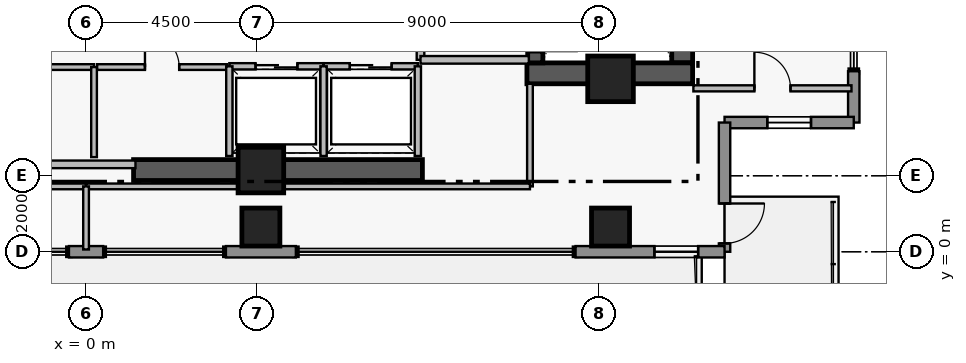
"""IFC4 building model, lengths in metres.
Left out: names, types, materials, properties, quantities, classifications, styles, units other than length and angle.
Written with IfcOpenShell. Run it as: python <this file> out.ifc"""

import sys

from ifc_helpers import new_model, si_unit, direction, frame, frame_2d, origin, origin_2d, place, context, subcontext, project, spatial, rectangle, extrude, element, fill, save


model = new_model("IFC4")
c1 = context("Model", 3, precision=1e-05, world=origin(), true_north=direction((0.0, 1.0)))
c2 = subcontext(c1, "Body", "Model", "MODEL_VIEW")
j1 = project(units=[si_unit("LENGTHUNIT", "METRE"), si_unit("PLANEANGLEUNIT", "RADIAN")], contexts=[c1])
p1 = place(None, origin())
s1 = spatial("IfcSite", under=j1, at=p1, CompositionType="ELEMENT")
p2 = place(p1, origin())
s2 = spatial("IfcBuilding", under=s1, at=p2, CompositionType="ELEMENT")
p3 = place(p2, frame((0.0, 0.0, 254.45)))
s3 = spatial("IfcBuildingStorey", under=s2, at=p3, CompositionType="ELEMENT", Elevation=254.45)
p4 = place(p3, frame((15.685, 4.97, 0.0), z_axis=(0.0, 0.0, 1.0), x_axis=(0.0, 1.0, 0.0)))
e1 = element("IfcWall", 1, at=p4, inside=s3, PredefinedType="SHEAR", context=c2, shape_type="SweptSolid", body=[
    extrude(rectangle(XDim=8.96, YDim=0.55, at=frame_2d((4.48, 0.0))), origin(), (0.0, 0.0, 1.0), 3.51),
])
p5 = place(p3, frame((11.6, 4.695, 0.0), z_axis=(0.0, 0.0, 1.0), x_axis=(1.0, 0.0, 0.0)))
e2 = element("IfcWall", 2, at=p5, inside=s3, PredefinedType="SHEAR", context=c2, shape_type="SweptSolid", body=[
    extrude(rectangle(XDim=4.36, YDim=0.55, at=frame_2d((2.18, 0.0))), origin(), (0.0, 0.0, 1.0), 3.51),
])
p6 = place(p3, frame((1.25, 2.15, 0.0), z_axis=(0.0, 0.0, 1.0), x_axis=(1.0, 0.0, 0.0)))
e3 = element("IfcWall", 3, at=p6, inside=s3, PredefinedType="SHEAR", context=c2, shape_type="SweptSolid", body=[
    extrude(rectangle(XDim=7.6, YDim=0.55, at=frame_2d((3.8, 0.0))), origin(), (0.0, 0.0, 1.0), 3.48),
])
p7 = place(p3, frame((11.82, 13.93, 0.0), z_axis=(0.0, 0.0, 1.0), x_axis=(0.0, -1.0, 0.0)))
e4 = element("IfcWall", 4, at=p7, inside=s3, PredefinedType="SHEAR", context=c2, shape_type="SweptSolid", body=[
    extrude(rectangle(XDim=8.96, YDim=0.4, at=frame_2d((4.48, 0.0))), origin(), (0.0, 0.0, 1.0), 3.51),
])
p8 = place(p7, frame((7.53, 0.0, 0.0)))
e5 = element("IfcOpeningElement", 5, at=p8, cuts=e4, PredefinedType="OPENING", context=c2, shape_type="SweptSolid", body=[
    extrude(rectangle(XDim=1.12, YDim=2.22, at=frame_2d((0.56, 1.11))), frame((0.0, 0.21, 0.0), z_axis=(0.0, -1.0, 0.0), x_axis=(1.0, 0.0, 0.0)), (0.0, 0.0, 1.0), 0.42),
])
for number, where, z_axis, x_axis in (
    (6, (4.6, 2.15, 0.0), (0.0, 0.0, 1.0), (1.0, 0.0, 0.0)),
    (7, (13.8, 4.55, 0.0), (0.0, 0.0, 1.0), (1.0, 0.0, 0.0)),
):
    element("IfcColumn", number, at=place(p3, frame(where, z_axis=z_axis, x_axis=x_axis)), inside=s3, PredefinedType="COLUMN", context=c2, shape_type="SweptSolid", body=[
        extrude(rectangle(XDim=1.2, YDim=1.2, at=origin_2d()), origin(), (0.0, 0.0, 1.0), 3.7),
    ])
for number, where, z_axis, x_axis in (
    (8, (4.6, 0.65, 0.0), (0.0, 0.0, 1.0), (1.0, 0.0, 0.0)),
    (9, (13.8, 0.65, 0.0), (0.0, 0.0, 1.0), (1.0, 0.0, 0.0)),
):
    element("IfcColumn", number, at=place(p3, frame(where, z_axis=z_axis, x_axis=x_axis)), inside=s3, PredefinedType="COLUMN", context=c2, shape_type="SweptSolid", body=[
        extrude(rectangle(XDim=1.0, YDim=1.0, at=origin_2d()), origin(), (0.0, 0.0, 1.0), 3.7),
    ])
p9 = place(p3, frame((20.2, 4.75, 0.0), z_axis=(0.0, 0.0, 1.0), x_axis=(0.0, -1.0, 0.0)))
e10 = element("IfcWall", 10, at=p9, inside=s3, PredefinedType="STANDARD", context=c2, shape_type="SweptSolid", body=[
    extrude(rectangle(XDim=1.35, YDim=0.3, at=frame_2d((0.675, 0.0))), origin(), (0.0, 0.0, 1.0), 3.48),
])
p10 = place(p3, frame((20.2, 3.4, 0.0), z_axis=(0.0, 0.0, 1.0), x_axis=(-1.0, 0.0, 0.0)))
e11 = element("IfcWall", 11, at=p10, inside=s3, PredefinedType="STANDARD", context=c2, shape_type="SweptSolid", body=[
    extrude(rectangle(XDim=3.4, YDim=0.3, at=frame_2d((1.7, 0.0))), origin(), (0.0, 0.0, 1.0), 3.48),
])
p11 = place(p10, frame((1.125, 0.0, 1.25)))
e12 = element("IfcOpeningElement", 12, at=p11, cuts=e11, PredefinedType="OPENING", context=c2, shape_type="SweptSolid", body=[
    extrude(rectangle(XDim=1.15, YDim=1.55, at=frame_2d((0.575, 0.775))), frame((0.0, 0.16, 0.0), z_axis=(0.0, -1.0, 0.0), x_axis=(1.0, 0.0, 0.0)), (0.0, 0.0, 1.0), 0.32),
])
p12 = place(p3, frame((16.8, 3.4, 0.0), z_axis=(0.0, 0.0, 1.0), x_axis=(0.0, -1.0, 0.0)))
e13 = element("IfcWall", 13, at=p12, inside=s3, PredefinedType="STANDARD", context=c2, shape_type="SweptSolid", body=[
    extrude(rectangle(XDim=3.4, YDim=0.3, at=frame_2d((1.7, 0.0))), origin(), (0.0, 0.0, 1.0), 3.48),
])
p13 = place(p12, frame((2.13, 0.0, 0.0)))
e14 = element("IfcOpeningElement", 14, at=p13, cuts=e13, PredefinedType="OPENING", context=c2, shape_type="SweptSolid", body=[
    extrude(rectangle(XDim=1.05, YDim=2.2, at=frame_2d((0.525, 1.1))), frame((0.0, 0.16, 0.0), z_axis=(0.0, -1.0, 0.0), x_axis=(1.0, 0.0, 0.0)), (0.0, 0.0, 1.0), 0.32),
])
p14 = place(p3, frame((16.8, 0.0, 0.0), z_axis=(0.0, 0.0, 1.0), x_axis=(-1.0, 0.0, 0.0)))
e15 = element("IfcWall", 15, at=p14, inside=s3, PredefinedType="STANDARD", context=c2, shape_type="SweptSolid", body=[
    extrude(rectangle(XDim=3.92, YDim=0.3, at=frame_2d((1.96, 0.0))), origin(), (0.0, 0.0, 1.0), 3.48),
])
p15 = place(p14, frame((0.695, 0.0, 0.95)))
e16 = element("IfcOpeningElement", 16, at=p15, cuts=e15, PredefinedType="OPENING", context=c2, shape_type="SweptSolid", body=[
    extrude(rectangle(XDim=1.15, YDim=1.55, at=frame_2d((0.575, 0.775))), frame((0.0, 0.16, 0.0), z_axis=(0.0, -1.0, 0.0), x_axis=(1.0, 0.0, 0.0)), (0.0, 0.0, 1.0), 0.32),
])
p16 = place(p3, frame((5.52, 0.0, 0.0), z_axis=(0.0, 0.0, 1.0), x_axis=(-1.0, 0.0, 0.0)))
e17 = element("IfcWall", 17, at=p16, inside=s3, PredefinedType="STANDARD", context=c2, shape_type="SweptSolid", body=[
    extrude(rectangle(XDim=1.84, YDim=0.3, at=frame_2d((0.92, 0.0))), origin(), (0.0, 0.0, 1.0), 3.48),
])
p17 = place(p3, frame((0.45, 0.0, 0.0), z_axis=(0.0, 0.0, 1.0), x_axis=(-1.0, 0.0, 0.0)))
e18 = element("IfcWall", 18, at=p17, inside=s3, PredefinedType="STANDARD", context=c2, shape_type="SweptSolid", body=[
    extrude(rectangle(XDim=0.9, YDim=0.3, at=frame_2d((0.45, 0.0))), origin(), (0.0, 0.0, 1.0), 3.48),
])
p18 = place(p3, frame((8.8, 11.15, 0.0), z_axis=(0.0, 0.0, 1.0), x_axis=(0.0, -1.0, 0.0)))
e19 = element("IfcWall", 19, at=p18, inside=s3, PredefinedType="PARTITIONING", context=c2, shape_type="SweptSolid", body=[
    extrude(rectangle(XDim=6.1, YDim=0.2, at=frame_2d((3.05, 0.0))), origin(), (0.0, 0.0, 1.0), 3.48),
])
p19 = place(p18, frame((1.15, 0.0, 0.0)))
e20 = element("IfcOpeningElement", 20, at=p19, cuts=e19, PredefinedType="OPENING", context=c2, shape_type="SweptSolid", body=[
    extrude(rectangle(XDim=1.1, YDim=2.2, at=frame_2d((0.55, 1.1))), frame((0.0, 0.11, 0.0), z_axis=(0.0, -1.0, 0.0), x_axis=(1.0, 0.0, 0.0)), (0.0, 0.0, 1.0), 0.22),
])
p20 = place(p18, frame((4.75, 0.0, 0.0)))
e21 = element("IfcOpeningElement", 21, at=p20, cuts=e19, PredefinedType="OPENING", context=c2, shape_type="SweptSolid", body=[
    extrude(rectangle(XDim=1.1, YDim=2.2, at=frame_2d((0.55, 1.1))), frame((0.0, 0.11, 0.0), z_axis=(0.0, -1.0, 0.0), x_axis=(1.0, 0.0, 0.0)), (0.0, 0.0, 1.0), 0.22),
])
p21 = place(p3, frame((3.77, 4.88, 0.0), z_axis=(0.0, 0.0, 1.0), x_axis=(1.0, 0.0, 0.0)))
e22 = element("IfcWall", 22, at=p21, inside=s3, PredefinedType="PARTITIONING", context=c2, shape_type="SweptSolid", body=[
    extrude(rectangle(XDim=2.48, YDim=0.165, at=frame_2d((1.24, 0.0))), origin(), (0.0, 0.0, 1.0), 3.48),
])
p22 = place(p21, frame((0.69, 0.0, 0.0)))
e23 = element("IfcOpeningElement", 23, at=p22, cuts=e22, PredefinedType="OPENING", context=c2, shape_type="SweptSolid", body=[
    extrude(rectangle(XDim=1.1, YDim=2.25, at=frame_2d((0.55, 1.125))), frame((0.0, 0.093, 0.0), z_axis=(0.0, -1.0, 0.0), x_axis=(1.0, 0.0, 0.0)), (0.0, 0.0, 1.0), 0.185),
])
p23 = place(p3, frame((6.25, 4.88, 0.0), z_axis=(0.0, 0.0, 1.0), x_axis=(1.0, 0.0, 0.0)))
e24 = element("IfcWall", 24, at=p23, inside=s3, PredefinedType="PARTITIONING", context=c2, shape_type="SweptSolid", body=[
    extrude(rectangle(XDim=2.48, YDim=0.165, at=frame_2d((1.24, 0.0))), origin(), (0.0, 0.0, 1.0), 3.48),
])
p24 = place(p23, frame((0.69, 0.0, 0.0)))
e25 = element("IfcOpeningElement", 25, at=p24, cuts=e24, PredefinedType="OPENING", context=c2, shape_type="SweptSolid", body=[
    extrude(rectangle(XDim=1.1, YDim=2.25, at=frame_2d((0.55, 1.125))), frame((0.0, 0.093, 0.0), z_axis=(0.0, -1.0, 0.0), x_axis=(1.0, 0.0, 0.0)), (0.0, 0.0, 1.0), 0.185),
])
p25 = place(p3, frame((-4.41, 4.86, 0.0), z_axis=(0.0, 0.0, 1.0), x_axis=(1.0, 0.0, 0.0)))
e26 = element("IfcWall", 26, at=p25, inside=s3, PredefinedType="PARTITIONING", context=c2, shape_type="SweptSolid", body=[
    extrude(rectangle(XDim=4.62, YDim=0.15, at=frame_2d((2.31, 0.0))), origin(), (0.0, 0.0, 1.0), 3.48),
])
p26 = place(p25, frame((1.86, 0.0, 0.0)))
e27 = element("IfcOpeningElement", 27, at=p26, cuts=e26, PredefinedType="OPENING", context=c2, shape_type="SweptSolid", body=[
    extrude(rectangle(XDim=0.9, YDim=2.15, at=frame_2d((0.45, 1.075))), frame((0.0, 0.085, 0.0), z_axis=(0.0, -1.0, 0.0), x_axis=(1.0, 0.0, 0.0)), (0.0, 0.0, 1.0), 0.17),
])
p27 = place(p3, frame((0.29, 4.86, 0.0), z_axis=(0.0, 0.0, 1.0), x_axis=(1.0, 0.0, 0.0)))
e28 = element("IfcWall", 28, at=p27, inside=s3, PredefinedType="PARTITIONING", context=c2, shape_type="SweptSolid", body=[
    extrude(rectangle(XDim=3.42, YDim=0.15, at=frame_2d((1.71, 0.0))), origin(), (0.0, 0.0, 1.0), 3.48),
])
p28 = place(p27, frame((1.26, 0.0, 0.0)))
e29 = element("IfcOpeningElement", 29, at=p28, cuts=e28, PredefinedType="OPENING", context=c2, shape_type="SweptSolid", body=[
    extrude(rectangle(XDim=0.9, YDim=2.15, at=frame_2d((0.45, 1.075))), frame((0.0, 0.085, 0.0), z_axis=(0.0, -1.0, 0.0), x_axis=(1.0, 0.0, 0.0)), (0.0, 0.0, 1.0), 0.17),
])
p29 = place(p3, frame((15.98, 4.3, 0.0), z_axis=(0.0, 0.0, 1.0), x_axis=(1.0, 0.0, 0.0)))
e30 = element("IfcWall", 30, at=p29, inside=s3, PredefinedType="PARTITIONING", context=c2, shape_type="SweptSolid", body=[
    extrude(rectangle(XDim=4.16, YDim=0.16, at=frame_2d((2.08, 0.0))), origin(), (0.0, 0.0, 1.0), 3.48),
])
p30 = place(p29, frame((1.605, 0.0, 0.0)))
e31 = element("IfcOpeningElement", 31, at=p30, cuts=e30, PredefinedType="OPENING", context=c2, shape_type="SweptSolid", body=[
    extrude(rectangle(XDim=0.95, YDim=2.15, at=frame_2d((0.475, 1.075))), frame((0.0, 0.09, 0.0), z_axis=(0.0, -1.0, 0.0), x_axis=(1.0, 0.0, 0.0)), (0.0, 0.0, 1.0), 0.18),
])
p31 = place(p3, frame((8.8, 5.05, 0.0), z_axis=(0.0, 0.0, 1.0), x_axis=(1.0, 0.0, 0.0)))
e32 = element("IfcWall", 32, at=p31, inside=s3, PredefinedType="PARTITIONING", context=c2, shape_type="SweptSolid", body=[
    extrude(rectangle(XDim=2.85, YDim=0.2, at=frame_2d((1.425, 0.0))), origin(), (0.0, 0.0, 1.0), 3.48),
])
for number, where, z_axis, x_axis in (
    (33, (3.77, 2.52, 0.0), (0.0, 0.0, 1.0), (0.0, 1.0, 0.0)),
    (34, (6.25, 2.52, 0.0), (0.0, 0.0, 1.0), (0.0, 1.0, 0.0)),
    (35, (8.73, 2.52, 0.0), (0.0, 0.0, 1.0), (0.0, 1.0, 0.0)),
):
    element("IfcWall", number, at=place(p3, frame(where, z_axis=z_axis, x_axis=x_axis)), inside=s3, PredefinedType="PARTITIONING", context=c2, shape_type="SweptSolid", body=[
        extrude(rectangle(XDim=2.36, YDim=0.165, at=frame_2d((1.18, 0.0))), origin(), (0.0, 0.0, 1.0), 3.48),
    ])
p32 = place(p3, frame((-1.3, 2.3, 0.0), z_axis=(0.0, 0.0, 1.0), x_axis=(1.0, 0.0, 0.0)))
e36 = element("IfcWall", 36, at=p32, inside=s3, PredefinedType="PARTITIONING", context=c2, shape_type="SweptSolid", body=[
    extrude(rectangle(XDim=2.6, YDim=0.2, at=frame_2d((1.3, 0.0))), origin(), (0.0, 0.0, 1.0), 2.38),
])
p33 = place(p3, frame((0.21, 2.49, 0.0), z_axis=(0.0, 0.0, 1.0), x_axis=(0.0, 1.0, 0.0)))
e37 = element("IfcWall", 37, at=p33, inside=s3, PredefinedType="PARTITIONING", context=c2, shape_type="SweptSolid", body=[
    extrude(rectangle(XDim=2.37, YDim=0.15, at=frame_2d((1.185, 0.0))), origin(), (0.0, 0.0, 1.0), 3.48),
])
p34 = place(p3, frame((-11.68, 1.72, 0.0), z_axis=(0.0, 0.0, 1.0), x_axis=(1.0, 0.0, 0.0)))
e38 = element("IfcWall", 38, at=p34, inside=s3, PredefinedType="PARTITIONING", context=c2, shape_type="SweptSolid", body=[
    extrude(rectangle(XDim=11.68, YDim=0.15, at=frame_2d((5.84, 0.0))), origin(), (0.0, 0.0, 1.0), 2.38),
])
p35 = place(p3, frame((11.68, 1.72, 0.0), z_axis=(0.0, 0.0, 1.0), x_axis=(0.0, 1.0, 0.0)))
e39 = element("IfcWall", 39, at=p35, inside=s3, PredefinedType="PARTITIONING", context=c2, shape_type="SweptSolid", body=[
    extrude(rectangle(XDim=2.7, YDim=0.15, at=frame_2d((1.35, 0.0))), origin(), (0.0, 0.0, 1.0), 3.48),
])
p36 = place(p3, frame((0.0, 1.72, 0.0), z_axis=(0.0, 0.0, 1.0), x_axis=(1.0, 0.0, 0.0)))
e40 = element("IfcWall", 40, at=p36, inside=s3, PredefinedType="PARTITIONING", context=c2, shape_type="SweptSolid", body=[
    extrude(rectangle(XDim=11.68, YDim=0.15, at=frame_2d((5.84, 0.0))), origin(), (0.0, 0.0, 1.0), 2.38),
])
p37 = place(p3, frame((0.0, 0.06, 0.0), z_axis=(0.0, 0.0, 1.0), x_axis=(0.0, 1.0, 0.0)))
e41 = element("IfcWall", 41, at=p37, inside=s3, PredefinedType="PARTITIONING", context=c2, shape_type="SweptSolid", body=[
    extrude(rectangle(XDim=1.66, YDim=0.15, at=frame_2d((0.83, 0.0))), origin(), (0.0, 0.0, 1.0), 3.48),
])
p38 = place(p11, origin())
e42 = element("IfcWindow", 42, at=p38, inside=s3, PartitioningType="SINGLE_PANEL", PredefinedType="WINDOW", context=c2, shape_type="SweptSolid", body=[
    extrude(rectangle(XDim=1.15, YDim=1.55, at=frame_2d((0.575, 0.775))), frame((0.0, 0.03, 0.0), z_axis=(0.0, -1.0, 0.0), x_axis=(1.0, 0.0, 0.0)), (0.0, 0.0, 1.0), 0.06),
])
fill(e12, e42)
p39 = place(p13, origin())
e43 = element("IfcDoor", 43, at=p39, inside=s3, OperationType="SINGLE_SWING_LEFT", PredefinedType="DOOR", context=c2, shape_type="SweptSolid", body=[
    extrude(rectangle(XDim=1.05, YDim=2.2, at=frame_2d((0.525, 1.1))), frame((0.0, 0.025, 0.0), z_axis=(0.0, -1.0, 0.0), x_axis=(1.0, 0.0, 0.0)), (0.0, 0.0, 1.0), 0.05),
])
fill(e14, e43)
p40 = place(p15, origin())
e44 = element("IfcWindow", 44, at=p40, inside=s3, PartitioningType="SINGLE_PANEL", PredefinedType="WINDOW", context=c2, shape_type="SweptSolid", body=[
    extrude(rectangle(XDim=1.15, YDim=1.55, at=frame_2d((0.575, 0.775))), frame((0.0, 0.03, 0.0), z_axis=(0.0, -1.0, 0.0), x_axis=(1.0, 0.0, 0.0)), (0.0, 0.0, 1.0), 0.06),
])
fill(e16, e44)
p41 = place(p22, origin())
e45 = element("IfcDoor", 45, at=p41, inside=s3, OperationType="SLIDING_TO_LEFT", PredefinedType="DOOR", context=c2, shape_type="SweptSolid", body=[
    extrude(rectangle(XDim=1.1, YDim=2.25, at=frame_2d((0.55, 1.125))), frame((0.0, 0.025, 0.0), z_axis=(0.0, -1.0, 0.0), x_axis=(1.0, 0.0, 0.0)), (0.0, 0.0, 1.0), 0.05),
])
fill(e23, e45)
p42 = place(p24, origin())
e46 = element("IfcDoor", 46, at=p42, inside=s3, OperationType="SLIDING_TO_LEFT", PredefinedType="DOOR", context=c2, shape_type="SweptSolid", body=[
    extrude(rectangle(XDim=1.1, YDim=2.25, at=frame_2d((0.55, 1.125))), frame((0.0, 0.025, 0.0), z_axis=(0.0, -1.0, 0.0), x_axis=(1.0, 0.0, 0.0)), (0.0, 0.0, 1.0), 0.05),
])
fill(e25, e46)
p43 = place(p28, origin())
e47 = element("IfcDoor", 47, at=p43, inside=s3, OperationType="SINGLE_SWING_LEFT", PredefinedType="DOOR", context=c2, shape_type="SweptSolid", body=[
    extrude(rectangle(XDim=0.9, YDim=2.15, at=frame_2d((0.45, 1.075))), frame((0.0, 0.025, 0.0), z_axis=(0.0, -1.0, 0.0), x_axis=(1.0, 0.0, 0.0)), (0.0, 0.0, 1.0), 0.05),
])
fill(e29, e47)
p44 = place(p30, origin())
e48 = element("IfcDoor", 48, at=p44, inside=s3, OperationType="SINGLE_SWING_LEFT", PredefinedType="DOOR", context=c2, shape_type="SweptSolid", body=[
    extrude(rectangle(XDim=0.95, YDim=2.15, at=frame_2d((0.475, 1.075))), frame((0.0, 0.025, 0.0), z_axis=(0.0, -1.0, 0.0), x_axis=(1.0, 0.0, 0.0)), (0.0, 0.0, 1.0), 0.05),
])
fill(e31, e48)
save(model, sys.argv[1])
